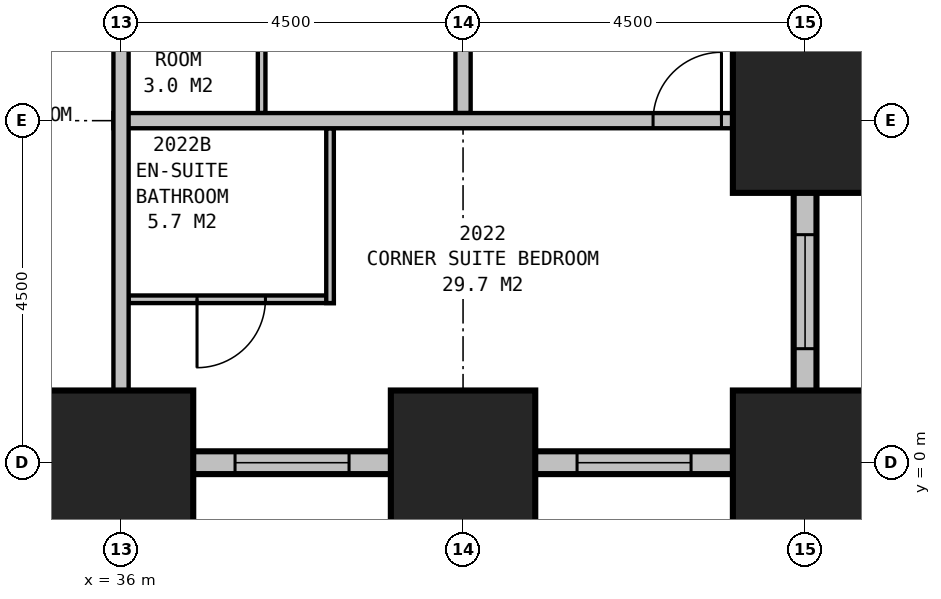
"""IFC4 building model, lengths in metres.
Left out: names, types, materials, properties, quantities, classifications, styles, units other than length and angle.
Written with IfcOpenShell. Run it as: python <this file> out.ifc"""

import sys

from ifc_helpers import new_model, si_unit, direction, frame, frame_2d, origin, origin_2d, place, context, subcontext, project, spatial, rectangle, extrude, element, fill, save


model = new_model("IFC4")
c1 = context("Model", 3, precision=1e-05, world=origin(), true_north=direction((0.0, 1.0)))
c2 = subcontext(c1, "Body", "Model", "MODEL_VIEW")
j1 = project(units=[si_unit("LENGTHUNIT", "METRE"), si_unit("PLANEANGLEUNIT", "RADIAN")], contexts=[c1])
p1 = place(None, origin())
s1 = spatial("IfcSite", under=j1, at=p1, CompositionType="ELEMENT")
p2 = place(p1, origin())
s2 = spatial("IfcBuilding", under=s1, at=p2, CompositionType="ELEMENT")
p3 = place(p2, frame((0.0, 0.0, 82.2)))
s3 = spatial("IfcBuildingStorey", under=s2, at=p3, CompositionType="ELEMENT", Elevation=82.2)
for number, where, z_axis, x_axis in (
    (1, (36.0, 0.0, 0.0), (0.0, 0.0, 1.0), (1.0, 0.0, 0.0)),
    (2, (40.5, 0.0, 0.0), (0.0, 0.0, 1.0), (1.0, 0.0, 0.0)),
    (3, (45.0, 0.0, 0.0), (0.0, 0.0, 1.0), (1.0, 0.0, 0.0)),
    (4, (45.0, 4.5, 0.0), (0.0, 0.0, 1.0), (1.0, 0.0, 0.0)),
):
    element("IfcColumn", number, at=place(p3, frame(where, z_axis=z_axis, x_axis=x_axis)), inside=s3, PredefinedType="COLUMN", context=c2, shape_type="SweptSolid", body=[
        extrude(rectangle(XDim=1.9, YDim=1.9, at=origin_2d()), origin(), (0.0, 0.0, 1.0), 3.5),
    ])
p4 = place(p3, frame((4.35, 0.0, 0.0), z_axis=(0.0, 0.0, 1.0), x_axis=(1.0, 0.0, 0.0)))
e5 = element("IfcWall", 5, at=p4, inside=s3, PredefinedType="STANDARD", context=c2, shape_type="SweptSolid", body=[
    extrude(rectangle(XDim=40.8, YDim=0.3, at=frame_2d((20.4, 0.0))), origin(), (0.0, 0.0, 1.0), 2.1),
])
p5 = place(p4, frame((1.65, 0.0, 0.5)))
e6 = element("IfcOpeningElement", 6, at=p5, cuts=e5, PredefinedType="OPENING", context=c2, shape_type="SweptSolid", body=[
    extrude(rectangle(XDim=1.5, YDim=1.4, at=frame_2d((0.75, 0.7))), frame((0.0, 0.16, 0.0), z_axis=(0.0, -1.0, 0.0), x_axis=(1.0, 0.0, 0.0)), (0.0, 0.0, 1.0), 0.32),
])
p6 = place(p4, frame((6.15, 0.0, 0.5)))
e7 = element("IfcOpeningElement", 7, at=p6, cuts=e5, PredefinedType="OPENING", context=c2, shape_type="SweptSolid", body=[
    extrude(rectangle(XDim=1.5, YDim=1.4, at=frame_2d((0.75, 0.7))), frame((0.0, 0.16, 0.0), z_axis=(0.0, -1.0, 0.0), x_axis=(1.0, 0.0, 0.0)), (0.0, 0.0, 1.0), 0.32),
])
p7 = place(p4, frame((10.65, 0.0, 0.5)))
e8 = element("IfcOpeningElement", 8, at=p7, cuts=e5, PredefinedType="OPENING", context=c2, shape_type="SweptSolid", body=[
    extrude(rectangle(XDim=1.5, YDim=1.4, at=frame_2d((0.75, 0.7))), frame((0.0, 0.16, 0.0), z_axis=(0.0, -1.0, 0.0), x_axis=(1.0, 0.0, 0.0)), (0.0, 0.0, 1.0), 0.32),
])
p8 = place(p4, frame((15.15, 0.0, 0.5)))
e9 = element("IfcOpeningElement", 9, at=p8, cuts=e5, PredefinedType="OPENING", context=c2, shape_type="SweptSolid", body=[
    extrude(rectangle(XDim=1.5, YDim=1.4, at=frame_2d((0.75, 0.7))), frame((0.0, 0.16, 0.0), z_axis=(0.0, -1.0, 0.0), x_axis=(1.0, 0.0, 0.0)), (0.0, 0.0, 1.0), 0.32),
])
p9 = place(p4, frame((19.65, 0.0, 0.5)))
e10 = element("IfcOpeningElement", 10, at=p9, cuts=e5, PredefinedType="OPENING", context=c2, shape_type="SweptSolid", body=[
    extrude(rectangle(XDim=1.5, YDim=1.4, at=frame_2d((0.75, 0.7))), frame((0.0, 0.16, 0.0), z_axis=(0.0, -1.0, 0.0), x_axis=(1.0, 0.0, 0.0)), (0.0, 0.0, 1.0), 0.32),
])
p10 = place(p4, frame((24.15, 0.0, 0.5)))
e11 = element("IfcOpeningElement", 11, at=p10, cuts=e5, PredefinedType="OPENING", context=c2, shape_type="SweptSolid", body=[
    extrude(rectangle(XDim=1.5, YDim=1.4, at=frame_2d((0.75, 0.7))), frame((0.0, 0.16, 0.0), z_axis=(0.0, -1.0, 0.0), x_axis=(1.0, 0.0, 0.0)), (0.0, 0.0, 1.0), 0.32),
])
p11 = place(p4, frame((28.65, 0.0, 0.5)))
e12 = element("IfcOpeningElement", 12, at=p11, cuts=e5, PredefinedType="OPENING", context=c2, shape_type="SweptSolid", body=[
    extrude(rectangle(XDim=1.5, YDim=1.4, at=frame_2d((0.75, 0.7))), frame((0.0, 0.16, 0.0), z_axis=(0.0, -1.0, 0.0), x_axis=(1.0, 0.0, 0.0)), (0.0, 0.0, 1.0), 0.32),
])
p12 = place(p4, frame((33.15, 0.0, 0.5)))
e13 = element("IfcOpeningElement", 13, at=p12, cuts=e5, PredefinedType="OPENING", context=c2, shape_type="SweptSolid", body=[
    extrude(rectangle(XDim=1.5, YDim=1.4, at=frame_2d((0.75, 0.7))), frame((0.0, 0.16, 0.0), z_axis=(0.0, -1.0, 0.0), x_axis=(1.0, 0.0, 0.0)), (0.0, 0.0, 1.0), 0.32),
])
p13 = place(p4, frame((37.65, 0.0, 0.5)))
e14 = element("IfcOpeningElement", 14, at=p13, cuts=e5, PredefinedType="OPENING", context=c2, shape_type="SweptSolid", body=[
    extrude(rectangle(XDim=1.5, YDim=1.4, at=frame_2d((0.75, 0.7))), frame((0.0, 0.16, 0.0), z_axis=(0.0, -1.0, 0.0), x_axis=(1.0, 0.0, 0.0)), (0.0, 0.0, 1.0), 0.32),
])
p14 = place(p3, frame((45.0, -0.15, 0.0), z_axis=(0.0, 0.0, 1.0), x_axis=(0.0, 1.0, 0.0)))
e15 = element("IfcWall", 15, at=p14, inside=s3, PredefinedType="STANDARD", context=c2, shape_type="SweptSolid", body=[
    extrude(rectangle(XDim=4.8, YDim=0.3, at=frame_2d((2.4, 0.0))), origin(), (0.0, 0.0, 1.0), 2.1),
])
p15 = place(p14, frame((1.65, 0.0, 0.5)))
e16 = element("IfcOpeningElement", 16, at=p15, cuts=e15, PredefinedType="OPENING", context=c2, shape_type="SweptSolid", body=[
    extrude(rectangle(XDim=1.5, YDim=1.4, at=frame_2d((0.75, 0.7))), frame((0.0, 0.16, 0.0), z_axis=(0.0, -1.0, 0.0), x_axis=(1.0, 0.0, 0.0)), (0.0, 0.0, 1.0), 0.32),
])
p16 = place(p3, frame((44.85, 4.5, 0.0), z_axis=(0.0, 0.0, 1.0), x_axis=(1.0, 0.0, 0.0)))
e17 = element("IfcWall", 17, at=p16, inside=s3, PredefinedType="STANDARD", context=c2, shape_type="SweptSolid", body=[
    extrude(rectangle(XDim=4.3, YDim=0.3, at=frame_2d((2.15, 0.0))), origin(), (0.0, 0.0, 1.0), 2.1),
])
p17 = place(p16, frame((1.4, 0.0, 0.5)))
e18 = element("IfcOpeningElement", 18, at=p17, cuts=e17, PredefinedType="OPENING", context=c2, shape_type="SweptSolid", body=[
    extrude(rectangle(XDim=1.5, YDim=1.4, at=frame_2d((0.75, 0.7))), frame((0.0, 0.16, 0.0), z_axis=(0.0, -1.0, 0.0), x_axis=(1.0, 0.0, 0.0)), (0.0, 0.0, 1.0), 0.32),
])
p18 = place(p3, frame((49.017, 4.351, 0.0), z_axis=(0.0, 0.0, 1.0), x_axis=(-0.110433201132, 0.993883548555, 0.0)))
e19 = element("IfcWall", 19, at=p18, inside=s3, PredefinedType="STANDARD", context=c2, shape_type="SweptSolid", body=[
    extrude(rectangle(XDim=31.994, YDim=0.3, at=frame_2d((15.997, 0.0))), origin(), (0.0, 0.0, 1.0), 2.1),
])
p19 = place(p18, frame((1.664, 0.0, 0.5)))
e20 = element("IfcOpeningElement", 20, at=p19, cuts=e19, PredefinedType="OPENING", context=c2, shape_type="SweptSolid", body=[
    extrude(rectangle(XDim=1.5, YDim=1.4, at=frame_2d((0.75, 0.7))), frame((0.0, 0.16, 0.0), z_axis=(0.0, -1.0, 0.0), x_axis=(1.0, 0.0, 0.0)), (0.0, 0.0, 1.0), 0.32),
])
p20 = place(p18, frame((6.192, 0.0, 0.5)))
e21 = element("IfcOpeningElement", 21, at=p20, cuts=e19, PredefinedType="OPENING", context=c2, shape_type="SweptSolid", body=[
    extrude(rectangle(XDim=1.5, YDim=1.4, at=frame_2d((0.75, 0.7))), frame((0.0, 0.16, 0.0), z_axis=(0.0, -1.0, 0.0), x_axis=(1.0, 0.0, 0.0)), (0.0, 0.0, 1.0), 0.32),
])
p21 = place(p18, frame((10.719, 0.0, 0.5)))
e22 = element("IfcOpeningElement", 22, at=p21, cuts=e19, PredefinedType="OPENING", context=c2, shape_type="SweptSolid", body=[
    extrude(rectangle(XDim=1.5, YDim=1.4, at=frame_2d((0.75, 0.7))), frame((0.0, 0.16, 0.0), z_axis=(0.0, -1.0, 0.0), x_axis=(1.0, 0.0, 0.0)), (0.0, 0.0, 1.0), 0.32),
])
p22 = place(p18, frame((15.247, 0.0, 0.5)))
e23 = element("IfcOpeningElement", 23, at=p22, cuts=e19, PredefinedType="OPENING", context=c2, shape_type="SweptSolid", body=[
    extrude(rectangle(XDim=1.5, YDim=1.4, at=frame_2d((0.75, 0.7))), frame((0.0, 0.16, 0.0), z_axis=(0.0, -1.0, 0.0), x_axis=(1.0, 0.0, 0.0)), (0.0, 0.0, 1.0), 0.32),
])
p23 = place(p18, frame((19.775, 0.0, 0.5)))
e24 = element("IfcOpeningElement", 24, at=p23, cuts=e19, PredefinedType="OPENING", context=c2, shape_type="SweptSolid", body=[
    extrude(rectangle(XDim=1.5, YDim=1.4, at=frame_2d((0.75, 0.7))), frame((0.0, 0.16, 0.0), z_axis=(0.0, -1.0, 0.0), x_axis=(1.0, 0.0, 0.0)), (0.0, 0.0, 1.0), 0.32),
])
p24 = place(p18, frame((24.302, 0.0, 0.5)))
e25 = element("IfcOpeningElement", 25, at=p24, cuts=e19, PredefinedType="OPENING", context=c2, shape_type="SweptSolid", body=[
    extrude(rectangle(XDim=1.5, YDim=1.4, at=frame_2d((0.75, 0.7))), frame((0.0, 0.16, 0.0), z_axis=(0.0, -1.0, 0.0), x_axis=(1.0, 0.0, 0.0)), (0.0, 0.0, 1.0), 0.32),
])
p25 = place(p18, frame((28.83, 0.0, 0.5)))
e26 = element("IfcOpeningElement", 26, at=p25, cuts=e19, PredefinedType="OPENING", context=c2, shape_type="SweptSolid", body=[
    extrude(rectangle(XDim=1.5, YDim=1.4, at=frame_2d((0.75, 0.7))), frame((0.0, 0.16, 0.0), z_axis=(0.0, -1.0, 0.0), x_axis=(1.0, 0.0, 0.0)), (0.0, 0.0, 1.0), 0.32),
])
p26 = place(p3, frame((36.0, 11.2, 0.0), z_axis=(0.0, 0.0, 1.0), x_axis=(0.0, -1.0, 0.0)))
e27 = element("IfcWall", 27, at=p26, inside=s3, PredefinedType="PARTITIONING", context=c2, shape_type="SweptSolid", body=[
    extrude(rectangle(XDim=11.2, YDim=0.2, at=frame_2d((5.6, 0.0))), origin(), (0.0, 0.0, 1.0), 2.2),
])
p27 = place(p3, frame((35.9, 4.5, 0.0), z_axis=(0.0, 0.0, 1.0), x_axis=(1.0, 0.0, 0.0)))
e28 = element("IfcWall", 28, at=p27, inside=s3, PredefinedType="PARTITIONING", context=c2, shape_type="SweptSolid", body=[
    extrude(rectangle(XDim=9.1, YDim=0.2, at=frame_2d((4.55, 0.0))), origin(), (0.0, 0.0, 1.0), 3.25),
])
p28 = place(p27, frame((7.1, 0.0, 0.0)))
e29 = element("IfcOpeningElement", 29, at=p28, cuts=e28, PredefinedType="OPENING", context=c2, shape_type="SweptSolid", body=[
    extrude(rectangle(XDim=0.9, YDim=2.1, at=frame_2d((0.45, 1.05))), frame((0.0, 0.11, 0.0), z_axis=(0.0, -1.0, 0.0), x_axis=(1.0, 0.0, 0.0)), (0.0, 0.0, 1.0), 0.22),
])
p29 = place(p3, frame((40.5, 4.6, 0.0), z_axis=(0.0, 0.0, 1.0), x_axis=(0.0, 1.0, 0.0)))
e30 = element("IfcWall", 30, at=p29, inside=s3, PredefinedType="PARTITIONING", context=c2, shape_type="SweptSolid", body=[
    extrude(rectangle(XDim=8.8, YDim=0.2, at=frame_2d((4.4, 0.0))), origin(), (0.0, 0.0, 1.0), 2.2),
])
p30 = place(p29, frame((4.05, 0.0, 0.0)))
e31 = element("IfcOpeningElement", 31, at=p30, cuts=e30, PredefinedType="OPENING", context=c2, shape_type="SweptSolid", body=[
    extrude(rectangle(XDim=0.9, YDim=2.1, at=frame_2d((0.45, 1.05))), frame((0.0, 0.11, 0.0), z_axis=(0.0, -1.0, 0.0), x_axis=(1.0, 0.0, 0.0)), (0.0, 0.0, 1.0), 0.22),
])
p31 = place(p3, frame((37.85, 4.6, 0.0), z_axis=(0.0, 0.0, 1.0), x_axis=(0.0, 1.0, 0.0)))
e32 = element("IfcWall", 32, at=p31, inside=s3, PredefinedType="PLUMBINGWALL", context=c2, shape_type="SweptSolid", body=[
    extrude(rectangle(XDim=2.0, YDim=0.1, at=frame_2d((1.0, 0.0))), origin(), (0.0, 0.0, 1.0), 3.25),
])
p32 = place(p3, frame((38.75, 4.4, 0.0), z_axis=(0.0, 0.0, 1.0), x_axis=(0.0, -1.0, 0.0)))
e33 = element("IfcWall", 33, at=p32, inside=s3, PredefinedType="PLUMBINGWALL", context=c2, shape_type="SweptSolid", body=[
    extrude(rectangle(XDim=2.3, YDim=0.1, at=frame_2d((1.15, 0.0))), origin(), (0.0, 0.0, 1.0), 3.25),
])
p33 = place(p3, frame((36.1, 2.15, 0.0), z_axis=(0.0, 0.0, 1.0), x_axis=(1.0, 0.0, 0.0)))
e34 = element("IfcWall", 34, at=p33, inside=s3, PredefinedType="PLUMBINGWALL", context=c2, shape_type="SweptSolid", body=[
    extrude(rectangle(XDim=2.7, YDim=0.1, at=frame_2d((1.35, 0.0))), origin(), (0.0, 0.0, 1.0), 3.25),
])
p34 = place(p33, frame((1.8, 0.0, 0.0), z_axis=(0.0, 0.0, 1.0), x_axis=(-1.0, 0.0, 0.0)))
e35 = element("IfcOpeningElement", 35, at=p34, cuts=e34, PredefinedType="OPENING", context=c2, shape_type="SweptSolid", body=[
    extrude(rectangle(XDim=0.9, YDim=2.1, at=frame_2d((0.45, 1.05))), frame((0.0, 0.06, 0.0), z_axis=(0.0, -1.0, 0.0), x_axis=(1.0, 0.0, 0.0)), (0.0, 0.0, 1.0), 0.12),
])
p35 = place(p12, origin())
e36 = element("IfcWindow", 36, at=p35, inside=s3, PartitioningType="SINGLE_PANEL", PredefinedType="WINDOW", context=c2, shape_type="SweptSolid", body=[
    extrude(rectangle(XDim=1.5, YDim=1.4, at=frame_2d((0.75, 0.7))), frame((0.0, 0.03, 0.0), z_axis=(0.0, -1.0, 0.0), x_axis=(1.0, 0.0, 0.0)), (0.0, 0.0, 1.0), 0.06),
])
fill(e13, e36)
p36 = place(p13, origin())
e37 = element("IfcWindow", 37, at=p36, inside=s3, PartitioningType="SINGLE_PANEL", PredefinedType="WINDOW", context=c2, shape_type="SweptSolid", body=[
    extrude(rectangle(XDim=1.5, YDim=1.4, at=frame_2d((0.75, 0.7))), frame((0.0, 0.03, 0.0), z_axis=(0.0, -1.0, 0.0), x_axis=(1.0, 0.0, 0.0)), (0.0, 0.0, 1.0), 0.06),
])
fill(e14, e37)
p37 = place(p15, origin())
e38 = element("IfcWindow", 38, at=p37, inside=s3, PartitioningType="SINGLE_PANEL", PredefinedType="WINDOW", context=c2, shape_type="SweptSolid", body=[
    extrude(rectangle(XDim=1.5, YDim=1.4, at=frame_2d((0.75, 0.7))), frame((0.0, 0.03, 0.0), z_axis=(0.0, -1.0, 0.0), x_axis=(1.0, 0.0, 0.0)), (0.0, 0.0, 1.0), 0.06),
])
fill(e16, e38)
p38 = place(p28, origin())
e39 = element("IfcDoor", 39, at=p38, inside=s3, OperationType="SINGLE_SWING_RIGHT", PredefinedType="DOOR", context=c2, shape_type="SweptSolid", body=[
    extrude(rectangle(XDim=0.9, YDim=2.1, at=frame_2d((0.45, 1.05))), frame((0.0, 0.025, 0.0), z_axis=(0.0, -1.0, 0.0), x_axis=(1.0, 0.0, 0.0)), (0.0, 0.0, 1.0), 0.05),
])
fill(e29, e39)
p39 = place(p34, origin())
e40 = element("IfcDoor", 40, at=p39, inside=s3, OperationType="SINGLE_SWING_RIGHT", PredefinedType="DOOR", context=c2, shape_type="SweptSolid", body=[
    extrude(rectangle(XDim=0.9, YDim=2.1, at=frame_2d((0.45, 1.05))), frame((0.0, 0.025, 0.0), z_axis=(0.0, -1.0, 0.0), x_axis=(1.0, 0.0, 0.0)), (0.0, 0.0, 1.0), 0.05),
])
fill(e35, e40)
save(model, sys.argv[1])
